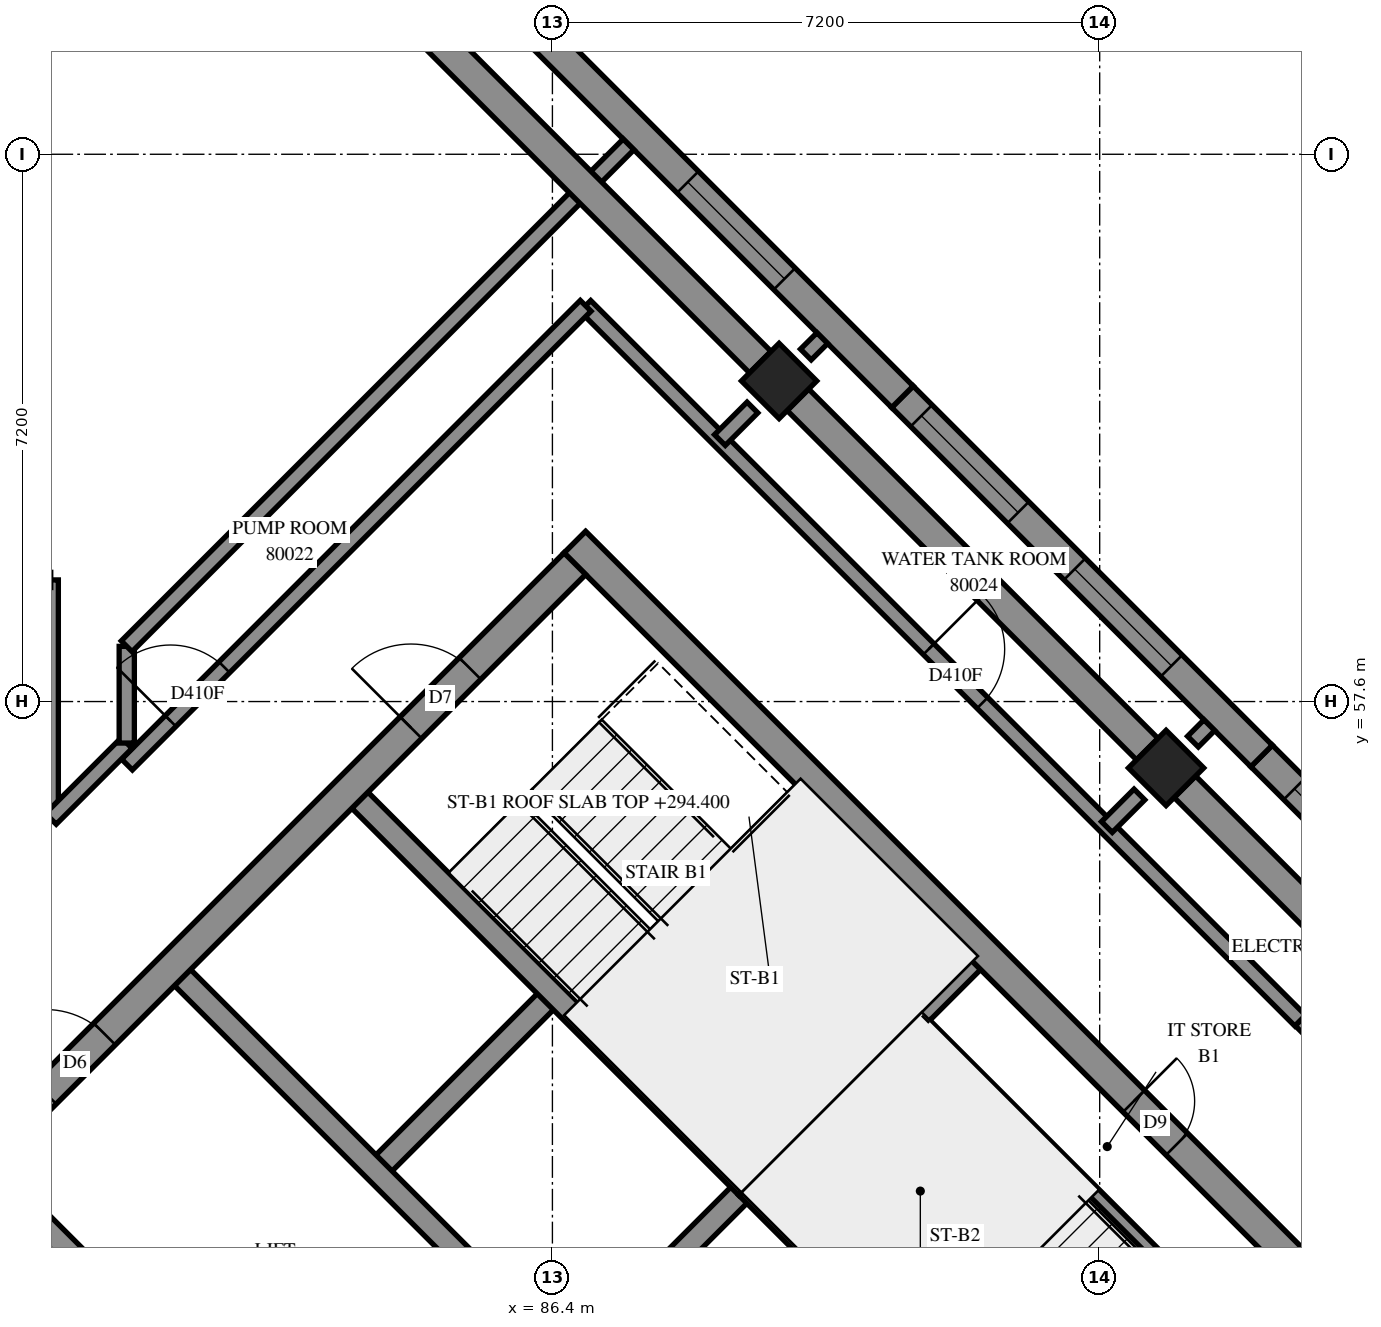
"""IFC4 building model, lengths in metres.
Left out: names, types, materials, properties, quantities, classifications, styles, units other than length and angle.
Written with IfcOpenShell. Run it as: python <this file> out.ifc"""

import sys

from ifc_helpers import new_model, si_unit, direction, frame, frame_2d, origin, origin_2d, place, context, subcontext, project, spatial, polyline, rectangle, outline, extrude, element, fill, save


model = new_model("IFC4")
c1 = context("Model", 3, precision=1e-05, world=origin(), true_north=direction((0.0, 1.0)))
c2 = subcontext(c1, "Body", "Model", "MODEL_VIEW")
j1 = project(units=[si_unit("LENGTHUNIT", "METRE"), si_unit("PLANEANGLEUNIT", "RADIAN")], contexts=[c1])
p1 = place(None, origin())
s1 = spatial("IfcSite", under=j1, at=p1, CompositionType="ELEMENT")
p2 = place(p1, origin())
s2 = spatial("IfcBuilding", under=s1, at=p2, CompositionType="ELEMENT")
p3 = place(p2, frame((0.0, 0.0, 294.4)))
s3 = spatial("IfcBuildingStorey", under=s2, at=p3, CompositionType="ELEMENT", Elevation=294.4)
for number, where, z_axis, x_axis in (
    (1, (89.382, 61.818, 0.0), (0.0, 0.0, 1.0), (0.707, -0.707, 0.0)),
    (2, (94.474, 56.727, 0.0), (0.0, 0.0, 1.0), (0.707, -0.707, 0.0)),
):
    element("IfcColumn", number, at=place(p3, frame(where, z_axis=z_axis, x_axis=x_axis)), inside=s3, PredefinedType="COLUMN", context=c2, shape_type="SweptSolid", body=[
        extrude(rectangle(XDim=0.7, YDim=0.7, at=origin_2d()), origin(), (0.0, 0.0, 1.0), 3.5),
    ])
p4 = place(p3, frame((86.695, 59.696, -0.3), z_axis=(0.0, 0.0, 1.0), x_axis=(0.7071100706, -0.7071034917, 0.0)))
e3 = element("IfcWall", 3, at=p4, inside=s3, PredefinedType="SHEAR", context=c2, shape_type="SweptSolid", body=[
    extrude(outline(polyline([(0.0, 0.0), (15.2, 0.0), (15.2, 3.1), (0.0, 3.1), (0.0, 0.0)])), frame((0.0, 0.2, 0.0), z_axis=(0.0, -1.0, 0.0), x_axis=(1.0, 0.0, 0.0)), (0.0, 0.0, 1.0), 0.4),
])
p5 = place(p4, frame((10.4, 0.0, 0.3)))
e4 = element("IfcOpeningElement", 4, at=p5, cuts=e3, PredefinedType="OPENING", context=c2, shape_type="SweptSolid", body=[
    extrude(rectangle(XDim=0.8, YDim=2.1, at=frame_2d((0.4, 1.05))), frame((0.0, 0.21, 0.0), z_axis=(0.0, -1.0, 0.0), x_axis=(1.0, 0.0, 0.0)), (0.0, 0.0, 1.0), 0.42),
])
p6 = place(p3, frame((76.513, 49.231, -0.3), z_axis=(0.0, 0.0, 1.0), x_axis=(0.7071067812, 0.7071067812, 0.0)))
e5 = element("IfcWall", 5, at=p6, inside=s3, PredefinedType="SHEAR", context=c2, shape_type="SweptSolid", body=[
    extrude(outline(polyline([(0.0, 0.0), (14.4, 0.0), (14.4, 3.1), (0.0, 3.1), (0.0, 0.0)])), frame((0.0, 0.2, 0.0), z_axis=(0.0, -1.0, 0.0), x_axis=(1.0, 0.0, 0.0)), (0.0, 0.0, 1.0), 0.4),
])
p7 = place(p6, frame((4.55, 0.0, 0.3)))
e6 = element("IfcOpeningElement", 6, at=p7, cuts=e5, PredefinedType="OPENING", context=c2, shape_type="SweptSolid", body=[
    extrude(rectangle(XDim=1.1, YDim=2.1, at=frame_2d((0.55, 1.05))), frame((0.0, 0.21, 0.0), z_axis=(0.0, -1.0, 0.0), x_axis=(1.0, 0.0, 0.0)), (0.0, 0.0, 1.0), 0.42),
])
p8 = place(p6, frame((11.35, 0.0, 0.3)))
e7 = element("IfcOpeningElement", 7, at=p8, cuts=e5, PredefinedType="OPENING", context=c2, shape_type="SweptSolid", body=[
    extrude(rectangle(XDim=1.1, YDim=2.1, at=frame_2d((0.55, 1.05))), frame((0.0, 0.21, 0.0), z_axis=(0.0, -1.0, 0.0), x_axis=(1.0, 0.0, 0.0)), (0.0, 0.0, 1.0), 0.42),
])
p9 = place(p3, frame((84.079, 51.423, 0.0), z_axis=(0.0, 0.0, 1.0), x_axis=(0.7071219326, 0.7070916295, 0.0)))
e8 = element("IfcWall", 8, at=p9, inside=s3, PredefinedType="SOLIDWALL", context=c2, shape_type="SweptSolid", body=[
    extrude(outline(polyline([(0.0, 0.0), (3.3, 0.0), (3.3, 3.5), (0.0, 3.5), (0.0, 0.0)])), frame((0.0, 0.15, 0.0), z_axis=(0.0, -1.0, 0.0), x_axis=(1.0, 0.0, 0.0)), (0.0, 0.0, 1.0), 0.3),
])
p10 = place(p3, frame((86.625, 48.878, 0.0), z_axis=(0.0, 0.0, 1.0), x_axis=(0.7071067812, 0.7071067812, 0.0)))
e9 = element("IfcWall", 9, at=p10, inside=s3, PredefinedType="SOLIDWALL", context=c2, shape_type="SweptSolid", body=[
    extrude(outline(polyline([(0.0, 0.0), (3.3, 0.0), (3.3, 3.5), (0.0, 3.5), (0.0, 0.0)])), frame((0.0, 0.15, 0.0), z_axis=(0.0, -1.0, 0.0), x_axis=(1.0, 0.0, 0.0)), (0.0, 0.0, 1.0), 0.3),
])
p11 = place(p3, frame((78.988, 51.423, 0.0), z_axis=(0.0, 0.0, 1.0), x_axis=(0.7071067812, -0.7071067812, 0.0)))
e10 = element("IfcWall", 10, at=p11, inside=s3, PredefinedType="SOLIDWALL", context=c2, shape_type="SweptSolid", body=[
    extrude(outline(polyline([(0.0, 0.0), (14.4, 0.0), (14.4, 3.5), (0.0, 3.5), (0.0, 0.0)])), frame((0.0, 0.15, 0.0), z_axis=(0.0, -1.0, 0.0), x_axis=(1.0, 0.0, 0.0)), (0.0, 0.0, 1.0), 0.3),
])
p12 = place(p11, frame((12.05, 0.0, 0.0)))
e11 = element("IfcOpeningElement", 11, at=p12, cuts=e10, PredefinedType="OPENING", context=c2, shape_type="SweptSolid", body=[
    extrude(rectangle(XDim=1.1, YDim=2.1, at=frame_2d((0.55, 1.05))), frame((0.0, 0.16, 0.0), z_axis=(0.0, -1.0, 0.0), x_axis=(1.0, 0.0, 0.0)), (0.0, 0.0, 1.0), 0.32),
])
p13 = place(p3, frame((81.534, 53.969, 0.0), z_axis=(0.0, 0.0, 1.0), x_axis=(0.707103309, -0.7071102534, 0.0)))
e12 = element("IfcWall", 12, at=p13, inside=s3, PredefinedType="SOLIDWALL", context=c2, shape_type="SweptSolid", body=[
    extrude(outline(polyline([(0.0, 0.0), (14.4, 0.0), (14.4, 3.5), (0.0, 3.5), (0.0, 0.0)])), frame((0.0, 0.15, 0.0), z_axis=(0.0, -1.0, 0.0), x_axis=(1.0, 0.0, 0.0)), (0.0, 0.0, 1.0), 0.3),
])
p14 = place(p13, frame((12.05, 0.0, 0.0)))
e13 = element("IfcOpeningElement", 13, at=p14, cuts=e12, PredefinedType="OPENING", context=c2, shape_type="SweptSolid", body=[
    extrude(rectangle(XDim=1.1, YDim=2.1, at=frame_2d((0.55, 1.05))), frame((0.0, 0.16, 0.0), z_axis=(0.0, -1.0, 0.0), x_axis=(1.0, 0.0, 0.0)), (0.0, 0.0, 1.0), 0.32),
])
for number, where, z_axis, x_axis in (
    (14, (83.867, 56.302, 0.0), (0.0, 0.0, 1.0), (0.707, -0.707, 0.0)),
    (15, (88.958, 51.211, 0.0), (0.0, 0.0, 1.0), (0.707, -0.707, 0.0)),
):
    element("IfcWall", number, at=place(p3, frame(where, z_axis=z_axis, x_axis=x_axis)), inside=s3, PredefinedType="SOLIDWALL", context=c2, shape_type="SweptSolid", body=[
        extrude(outline(polyline([(0.0, 0.0), (7.2, 0.0), (7.2, 3.5), (0.0, 3.5), (0.0, 0.0)])), frame((0.0, 0.15, 0.0), z_axis=(0.0, -1.0, 0.0), x_axis=(1.0, 0.0, 0.0)), (0.0, 0.0, 1.0), 0.3),
    ])
p15 = place(p3, frame((88.958, 51.211, 0.0), z_axis=(0.0, 0.0, 1.0), x_axis=(0.7071067812, 0.7071067812, 0.0)))
e16 = element("IfcWall", 16, at=p15, inside=s3, PredefinedType="SOLIDWALL", context=c2, shape_type="SweptSolid", body=[
    extrude(outline(polyline([(0.0, 0.0), (4.2, 0.0), (4.2, 3.5), (0.0, 3.5), (0.0, 0.0)])), frame((0.0, 0.15, 0.0), z_axis=(0.0, -1.0, 0.0), x_axis=(1.0, 0.0, 0.0)), (0.0, 0.0, 1.0), 0.3),
])
p16 = place(p3, frame((100.48, 52.134, 0.0), z_axis=(0.0, 0.0, 1.0), x_axis=(-0.7071067812, 0.7071067812, 0.0)))
e17 = element("IfcWall", 17, at=p16, inside=s3, PredefinedType="SOLIDWALL", context=c2, shape_type="SweptSolid", body=[
    extrude(outline(polyline([(0.036, -0.2), (6.718, -0.2), (6.718, 0.2), (-0.036, 0.2), (0.036, -0.2)])), origin(), (0.0, 0.0, 1.0), 3.5),
])
p17 = place(p16, frame((1.147, 0.0, 0.7)))
e18 = element("IfcOpeningElement", 18, at=p17, cuts=e17, PredefinedType="OPENING", context=c2, shape_type="SweptSolid", body=[
    extrude(rectangle(XDim=1.8, YDim=2.2, at=frame_2d((0.9, 1.1))), frame((0.0, 0.21, 0.0), z_axis=(0.0, -1.0, 0.0), x_axis=(1.0, 0.0, 0.0)), (0.0, 0.0, 1.0), 0.42),
])
p18 = place(p16, frame((4.306, 0.0, 0.7)))
e19 = element("IfcOpeningElement", 19, at=p18, cuts=e17, PredefinedType="OPENING", context=c2, shape_type="SweptSolid", body=[
    extrude(rectangle(XDim=1.8, YDim=2.2, at=frame_2d((0.9, 1.1))), frame((0.0, 0.21, 0.0), z_axis=(0.0, -1.0, 0.0), x_axis=(1.0, 0.0, 0.0)), (0.0, 0.0, 1.0), 0.42),
])
p19 = place(p3, frame((95.73, 56.884, 0.0), z_axis=(0.0, 0.0, 1.0), x_axis=(-0.7071067812, 0.7071067812, 0.0)))
e20 = element("IfcWall", 20, at=p19, inside=s3, PredefinedType="SOLIDWALL", context=c2, shape_type="SweptSolid", body=[
    extrude(outline(polyline([(0.0, -0.2), (6.682, -0.2), (6.682, 0.2), (0.0, 0.2), (0.0, -0.2)])), origin(), (0.0, 0.0, 1.0), 3.5),
])
p20 = place(p19, frame((1.677, 0.0, 0.7)))
e21 = element("IfcOpeningElement", 21, at=p20, cuts=e20, PredefinedType="OPENING", context=c2, shape_type="SweptSolid", body=[
    extrude(rectangle(XDim=1.8, YDim=2.2, at=frame_2d((0.9, 1.1))), frame((0.0, 0.21, 0.0), z_axis=(0.0, -1.0, 0.0), x_axis=(1.0, 0.0, 0.0)), (0.0, 0.0, 1.0), 0.42),
])
p21 = place(p19, frame((4.529, 0.0, 0.7)))
e22 = element("IfcOpeningElement", 22, at=p21, cuts=e20, PredefinedType="OPENING", context=c2, shape_type="SweptSolid", body=[
    extrude(rectangle(XDim=1.8, YDim=2.2, at=frame_2d((0.9, 1.1))), frame((0.0, 0.21, 0.0), z_axis=(0.0, -1.0, 0.0), x_axis=(1.0, 0.0, 0.0)), (0.0, 0.0, 1.0), 0.42),
])
p22 = place(p3, frame((91.005, 61.609, 0.0), z_axis=(0.0, 0.0, 1.0), x_axis=(-0.7071142638, 0.7070992985, 0.0)))
e23 = element("IfcWall", 23, at=p22, inside=s3, PredefinedType="SOLIDWALL", context=c2, shape_type="SweptSolid", body=[
    extrude(outline(polyline([(0.0, -0.2), (6.682, -0.2), (6.682, 0.2), (0.0, 0.2), (0.0, -0.2)])), origin(), (0.0, 0.0, 1.0), 3.5),
])
p23 = place(p22, frame((2.195, 0.0, 0.7)))
e24 = element("IfcOpeningElement", 24, at=p23, cuts=e23, PredefinedType="OPENING", context=c2, shape_type="SweptSolid", body=[
    extrude(rectangle(XDim=1.8, YDim=2.2, at=frame_2d((0.9, 1.1))), frame((0.0, 0.21, 0.0), z_axis=(0.0, -1.0, 0.0), x_axis=(1.0, 0.0, 0.0)), (0.0, 0.0, 1.0), 0.42),
])
p24 = place(p3, frame((91.313, 53.354, 0.0), z_axis=(0.0, 0.0, 1.0), x_axis=(0.7071067812, -0.7071067812, 0.0)))
e25 = element("IfcWall", 25, at=p24, inside=s3, PredefinedType="PARTITIONING", context=c2, shape_type="SweptSolid", body=[
    extrude(outline(polyline([(0.0, 0.0), (5.65, 0.0), (5.65, 3.5), (0.0, 3.5), (0.0, 0.0)])), frame((0.0, 0.075, 0.0), z_axis=(0.0, -1.0, 0.0), x_axis=(1.0, 0.0, 0.0)), (0.0, 0.0, 1.0), 0.15),
])
p25 = place(p3, frame((86.833, 62.805, 0.0), z_axis=(0.0, 0.0, 1.0), x_axis=(0.7072045138, -0.7070090351, 0.0)))
e26 = element("IfcWall", 26, at=p25, inside=s3, PredefinedType="PARTITIONING", context=c2, shape_type="SweptSolid", body=[
    extrude(rectangle(XDim=13.301, YDim=0.2, at=frame_2d((6.65, 0.0))), origin(), (0.0, 0.0, 1.0), 3.5),
])
p26 = place(p25, frame((6.387, 0.0, 0.0)))
e27 = element("IfcOpeningElement", 27, at=p26, cuts=e26, PredefinedType="OPENING", context=c2, shape_type="SweptSolid", body=[
    extrude(rectangle(XDim=1.0, YDim=2.1, at=frame_2d((0.5, 1.05))), frame((0.0, 0.11, 0.0), z_axis=(0.0, -1.0, 0.0), x_axis=(1.0, 0.0, 0.0)), (0.0, 0.0, 1.0), 0.22),
])
p27 = place(p3, frame((80.803, 56.77, 0.0), z_axis=(0.0, 0.0, 1.0), x_axis=(0.7069896038, 0.7072239391, 0.0)))
e28 = element("IfcWall", 28, at=p27, inside=s3, PredefinedType="PARTITIONING", context=c2, shape_type="SweptSolid", body=[
    extrude(rectangle(XDim=8.535, YDim=0.2, at=frame_2d((4.267, 0.0))), origin(), (0.0, 0.0, 1.0), 3.5),
])
p28 = place(p27, frame((0.811, 0.0, 0.0)))
e29 = element("IfcOpeningElement", 29, at=p28, cuts=e28, PredefinedType="OPENING", context=c2, shape_type="SweptSolid", body=[
    extrude(rectangle(XDim=1.0, YDim=2.1, at=frame_2d((0.5, 1.05))), frame((0.0, 0.11, 0.0), z_axis=(0.0, -1.0, 0.0), x_axis=(1.0, 0.0, 0.0)), (0.0, 0.0, 1.0), 0.22),
])
p29 = place(p3, frame((96.244, 53.406, 0.0), z_axis=(0.0, 0.0, 1.0), x_axis=(0.7068288851, -0.7073845681, 0.0)))
e30 = element("IfcWall", 30, at=p29, inside=s3, PredefinedType="PARTITIONING", context=c2, shape_type="SweptSolid", body=[
    extrude(rectangle(XDim=3.599, YDim=0.2, at=frame_2d((1.8, 0.0))), origin(), (0.0, 0.0, 1.0), 3.5),
])
p30 = place(p29, frame((0.286, 0.0, 0.0)))
e31 = element("IfcOpeningElement", 31, at=p30, cuts=e30, PredefinedType="OPENING", context=c2, shape_type="SweptSolid", body=[
    extrude(rectangle(XDim=1.0, YDim=2.1, at=frame_2d((0.5, 1.05))), frame((0.0, 0.11, 0.0), z_axis=(0.0, -1.0, 0.0), x_axis=(1.0, 0.0, 0.0)), (0.0, 0.0, 1.0), 0.22),
])
p31 = place(p3, frame((79.8, 56.056, 0.0), z_axis=(0.0, 0.0, 1.0), x_axis=(0.0, 1.0, 0.0)))
e32 = element("IfcWall", 32, at=p31, inside=s3, PredefinedType="PARTITIONING", context=c2, shape_type="SweptSolid", body=[
    extrude(rectangle(XDim=3.144, YDim=0.2, at=frame_2d((1.572, 0.0))), origin(), (0.0, 0.0, 1.0), 3.5),
])
p32 = place(p3, frame((79.801, 56.057, 0.0), z_axis=(0.0, 0.0, 1.0), x_axis=(0.7071067812, 0.7071067812, 0.0)))
e33 = element("IfcWall", 33, at=p32, inside=s3, PredefinedType="PARTITIONING", context=c2, shape_type="SweptSolid", body=[
    extrude(rectangle(XDim=1.411, YDim=0.2, at=frame_2d((0.706, 0.0))), origin(), (0.0, 0.0, 1.0), 3.5),
])
p33 = place(p3, frame((80.8, 57.054, 0.0), z_axis=(0.0, 0.0, 1.0), x_axis=(0.0, 1.0, 0.0)))
e34 = element("IfcWall", 34, at=p33, inside=s3, PredefinedType="PARTITIONING", context=c2, shape_type="SweptSolid", body=[
    extrude(rectangle(XDim=1.272, YDim=0.2, at=frame_2d((0.636, 0.0))), origin(), (0.0, 0.0, 1.0), 3.5),
])
for number, where, z_axis, x_axis in (
    (35, (88.603, 61.041, 0.0), (0.0, 0.0, 1.0), (0.707, 0.707, 0.0)),
    (36, (93.695, 55.949, 0.0), (0.0, 0.0, 1.0), (0.707, 0.707, 0.0)),
):
    element("IfcWall", number, at=place(p3, frame(where, z_axis=z_axis, x_axis=x_axis)), inside=s3, PredefinedType="PARTITIONING", context=c2, shape_type="SweptSolid", body=[
        extrude(rectangle(XDim=0.605, YDim=0.2, at=frame_2d((0.303, 0.0))), origin(), (0.0, 0.0, 1.0), 3.5),
    ])
p34 = place(p3, frame((80.799, 58.327, 0.0), z_axis=(0.0, 0.0, 1.0), x_axis=(0.7071067812, 0.7071067812, 0.0)))
e37 = element("IfcWall", 37, at=p34, inside=s3, PredefinedType="PARTITIONING", context=c2, shape_type="SweptSolid", body=[
    extrude(outline(polyline([(0.0, -0.1), (9.338, -0.1), (9.338, 0.1), (0.0, 0.1), (0.0, -0.1)])), origin(), (0.0, 0.0, 1.0), 3.5),
])
p35 = place(p3, frame((94.827, 57.073, 0.0), z_axis=(0.0, 0.0, 1.0), x_axis=(0.7053010617, 0.7089079012, 0.0)))
e38 = element("IfcWall", 38, at=p35, inside=s3, PredefinedType="PARTITIONING", context=c2, shape_type="SweptSolid", body=[
    extrude(outline(polyline([(0.0, -0.1), (0.305, -0.1), (0.305, 0.1), (0.0, 0.1), (0.0, -0.1)])), origin(), (0.0, 0.0, 1.0), 3.5),
])
p36 = place(p3, frame((89.734, 62.166, 0.0), z_axis=(0.0, 0.0, 1.0), x_axis=(0.7089070674, 0.7053018997, 0.0)))
e39 = element("IfcWall", 39, at=p36, inside=s3, PredefinedType="PARTITIONING", context=c2, shape_type="SweptSolid", body=[
    extrude(outline(polyline([(0.0, -0.1), (0.305, -0.1), (0.305, 0.1), (0.0, 0.1), (0.0, -0.1)])), origin(), (0.0, 0.0, 1.0), 3.5),
])
p37 = place(p18, origin())
e40 = element("IfcWindow", 40, at=p37, inside=s3, PartitioningType="SINGLE_PANEL", PredefinedType="WINDOW", context=c2, shape_type="SweptSolid", body=[
    extrude(rectangle(XDim=1.8, YDim=2.2, at=frame_2d((0.9, 1.1))), frame((0.0, 0.08, 0.0), z_axis=(0.0, -1.0, 0.0), x_axis=(1.0, 0.0, 0.0)), (0.0, 0.0, 1.0), 0.06),
])
fill(e19, e40)
p38 = place(p20, origin())
e41 = element("IfcWindow", 41, at=p38, inside=s3, PartitioningType="SINGLE_PANEL", PredefinedType="WINDOW", context=c2, shape_type="SweptSolid", body=[
    extrude(rectangle(XDim=1.8, YDim=2.2, at=frame_2d((0.9, 1.1))), frame((0.0, 0.08, 0.0), z_axis=(0.0, -1.0, 0.0), x_axis=(1.0, 0.0, 0.0)), (0.0, 0.0, 1.0), 0.06),
])
fill(e21, e41)
p39 = place(p21, origin())
e42 = element("IfcWindow", 42, at=p39, inside=s3, PartitioningType="SINGLE_PANEL", PredefinedType="WINDOW", context=c2, shape_type="SweptSolid", body=[
    extrude(rectangle(XDim=1.8, YDim=2.2, at=frame_2d((0.9, 1.1))), frame((0.0, 0.08, 0.0), z_axis=(0.0, -1.0, 0.0), x_axis=(1.0, 0.0, 0.0)), (0.0, 0.0, 1.0), 0.06),
])
fill(e22, e42)
p40 = place(p23, origin())
e43 = element("IfcWindow", 43, at=p40, inside=s3, PartitioningType="SINGLE_PANEL", PredefinedType="WINDOW", context=c2, shape_type="SweptSolid", body=[
    extrude(rectangle(XDim=1.8, YDim=2.2, at=frame_2d((0.9, 1.1))), frame((0.0, 0.08, 0.0), z_axis=(0.0, -1.0, 0.0), x_axis=(1.0, 0.0, 0.0)), (0.0, 0.0, 1.0), 0.06),
])
fill(e24, e43)
p41 = place(p5, origin())
e44 = element("IfcDoor", 44, at=p41, inside=s3, OperationType="SINGLE_SWING_RIGHT", PredefinedType="DOOR", context=c2, shape_type="SweptSolid", body=[
    extrude(rectangle(XDim=0.8, YDim=2.1, at=frame_2d((0.4, 1.05))), frame((0.0, 0.025, 0.0), z_axis=(0.0, -1.0, 0.0), x_axis=(1.0, 0.0, 0.0)), (0.0, 0.0, 1.0), 0.05),
])
fill(e4, e44)
p42 = place(p7, origin())
e45 = element("IfcDoor", 45, at=p42, inside=s3, OperationType="DOUBLE_DOOR_SINGLE_SWING", PredefinedType="DOOR", context=c2, shape_type="SweptSolid", body=[
    extrude(rectangle(XDim=1.1, YDim=2.1, at=frame_2d((0.55, 1.05))), frame((0.0, 0.025, 0.0), z_axis=(0.0, -1.0, 0.0), x_axis=(1.0, 0.0, 0.0)), (0.0, 0.0, 1.0), 0.05),
])
fill(e6, e45)
p43 = place(p8, origin())
e46 = element("IfcDoor", 46, at=p43, inside=s3, OperationType="SINGLE_SWING_LEFT", PredefinedType="DOOR", context=c2, shape_type="SweptSolid", body=[
    extrude(rectangle(XDim=1.1, YDim=2.1, at=frame_2d((0.55, 1.05))), frame((0.0, 0.025, 0.0), z_axis=(0.0, -1.0, 0.0), x_axis=(1.0, 0.0, 0.0)), (0.0, 0.0, 1.0), 0.05),
])
fill(e7, e46)
p44 = place(p28, origin())
e47 = element("IfcDoor", 47, at=p44, inside=s3, OperationType="SINGLE_SWING_RIGHT", PredefinedType="DOOR", context=c2, shape_type="SweptSolid", body=[
    extrude(rectangle(XDim=1.0, YDim=2.1, at=frame_2d((0.5, 1.05))), frame((0.0, 0.025, 0.0), z_axis=(0.0, -1.0, 0.0), x_axis=(1.0, 0.0, 0.0)), (0.0, 0.0, 1.0), 0.05),
])
fill(e29, e47)
p45 = place(p26, origin())
e48 = element("IfcDoor", 48, at=p45, inside=s3, OperationType="SINGLE_SWING_LEFT", PredefinedType="DOOR", context=c2, shape_type="SweptSolid", body=[
    extrude(rectangle(XDim=1.0, YDim=2.1, at=frame_2d((0.5, 1.05))), frame((0.0, 0.025, 0.0), z_axis=(0.0, -1.0, 0.0), x_axis=(1.0, 0.0, 0.0)), (0.0, 0.0, 1.0), 0.05),
])
fill(e27, e48)
save(model, sys.argv[1])
